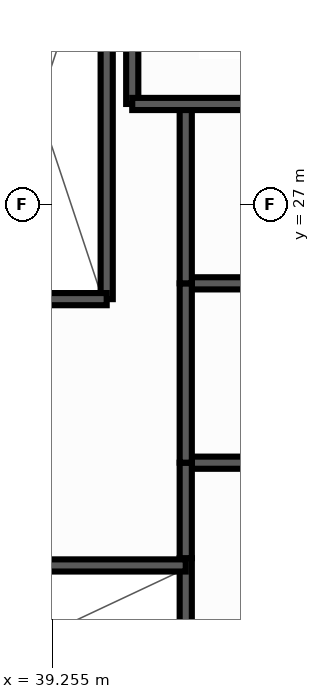
"""IFC4 building model, lengths in metres.
Left out: names, types, materials, properties, quantities, classifications, styles, units other than length and angle.
Written with IfcOpenShell. Run it as: python <this file> out.ifc"""

import sys

from ifc_helpers import new_model, si_unit, direction, frame, frame_2d, origin, place, context, subcontext, project, spatial, rectangle, extrude, source, transform, mapped, element, fill, save


model = new_model("IFC4")
c1 = context("Model", 3, precision=1e-05, world=origin(), true_north=direction((0.0, 1.0)))
c2 = subcontext(c1, "Body", "Model", "MODEL_VIEW")
j1 = project(units=[si_unit("LENGTHUNIT", "METRE"), si_unit("PLANEANGLEUNIT", "RADIAN")], contexts=[c1])
p1 = place(None, origin())
s1 = spatial("IfcSite", under=j1, at=p1, CompositionType="ELEMENT")
p2 = place(p1, origin())
s2 = spatial("IfcBuilding", under=s1, at=p2, CompositionType="ELEMENT")
p3 = place(p2, frame((0.0, 0.0, 148.7)))
s3 = spatial("IfcBuildingStorey", under=s2, at=p3, CompositionType="ELEMENT", Elevation=148.7)
p4 = place(p3, frame((41.55, 22.75, 0.0), z_axis=(0.0, 0.0, 1.0), x_axis=(1.0, 0.0, 0.0)))
e1 = element("IfcWall", 1, at=p4, inside=s3, PredefinedType="PARTITIONING", context=c2, shape_type="SweptSolid", body=[
    extrude(rectangle(XDim=2.67, YDim=0.2, at=frame_2d((1.335, 0.0))), origin(), (0.0, 0.0, 1.0), 3.16),
])
p5 = place(p3, frame((41.55, 25.7, 0.0), z_axis=(0.0, 0.0, 1.0), x_axis=(1.0, 0.0, 0.0)))
e2 = element("IfcWall", 2, at=p5, inside=s3, PredefinedType="PARTITIONING", context=c2, shape_type="SweptSolid", body=[
    extrude(rectangle(XDim=2.67, YDim=0.2, at=frame_2d((1.335, 0.0))), origin(), (0.0, 0.0, 1.0), 2.64),
])
p6 = place(p3, frame((41.45, 18.22, 0.0), z_axis=(0.0, 0.0, 1.0), x_axis=(0.0, 1.0, 0.0)))
e3 = element("IfcWall", 3, at=p6, inside=s3, PredefinedType="PARTITIONING", context=c2, shape_type="SweptSolid", body=[
    extrude(rectangle(XDim=2.96, YDim=0.2, at=frame_2d((1.48, 0.0))), origin(), (0.0, 0.0, 1.0), 3.16),
])
p7 = place(p3, frame((41.45, 21.18, 0.0), z_axis=(0.0, 0.0, 1.0), x_axis=(0.0, 1.0, 0.0)))
e4 = element("IfcWall", 4, at=p7, inside=s3, PredefinedType="PARTITIONING", context=c2, shape_type="SweptSolid", body=[
    extrude(rectangle(XDim=1.57, YDim=0.2, at=frame_2d((0.785, 0.0))), origin(), (0.0, 0.0, 1.0), 3.16),
])
p8 = place(p7, frame((0.38, 0.0, 0.0)))
e5 = element("IfcOpeningElement", 5, at=p8, cuts=e4, PredefinedType="OPENING", context=c2, shape_type="SweptSolid", body=[
    extrude(rectangle(XDim=0.8, YDim=2.05, at=frame_2d((0.4, 1.025))), frame((0.0, 0.112, 0.0), z_axis=(0.0, -1.0, 0.0), x_axis=(1.0, 0.0, 0.0)), (0.0, 0.0, 1.0), 0.224),
])
p9 = place(p3, frame((41.45, 22.75, 0.0), z_axis=(0.0, 0.0, 1.0), x_axis=(0.0, 1.0, 0.0)))
e6 = element("IfcWall", 6, at=p9, inside=s3, PredefinedType="PARTITIONING", context=c2, shape_type="SweptSolid", body=[
    extrude(rectangle(XDim=2.95, YDim=0.2, at=frame_2d((1.475, 0.0))), origin(), (0.0, 0.0, 1.0), 3.16),
])
p10 = place(p9, frame((1.05, 0.0, 0.0)))
e7 = element("IfcOpeningElement", 7, at=p10, cuts=e6, PredefinedType="OPENING", context=c2, shape_type="SweptSolid", body=[
    extrude(rectangle(XDim=0.8, YDim=2.05, at=frame_2d((0.4, 1.025))), frame((0.0, 0.112, 0.0), z_axis=(0.0, -1.0, 0.0), x_axis=(1.0, 0.0, 0.0)), (0.0, 0.0, 1.0), 0.224),
])
p11 = place(p3, frame((41.45, 25.7, 0.0), z_axis=(0.0, 0.0, 1.0), x_axis=(0.0, 1.0, 0.0)))
e8 = element("IfcWall", 8, at=p11, inside=s3, PredefinedType="PARTITIONING", context=c2, shape_type="SweptSolid", body=[
    extrude(rectangle(XDim=2.9, YDim=0.2, at=frame_2d((1.45, 0.0))), origin(), (0.0, 0.0, 1.0), 3.16),
])
p12 = place(p11, frame((1.0, 0.0, 0.0)))
e9 = element("IfcOpeningElement", 9, at=p12, cuts=e8, PredefinedType="OPENING", context=c2, shape_type="SweptSolid", body=[
    extrude(rectangle(XDim=0.9, YDim=2.1, at=frame_2d((0.45, 1.05))), frame((0.0, 0.112, 0.0), z_axis=(0.0, -1.0, 0.0), x_axis=(1.0, 0.0, 0.0)), (0.0, 0.0, 1.0), 0.224),
])
p13 = place(p3, frame((40.15, 25.44, 0.0), z_axis=(0.0, 0.0, 1.0), x_axis=(0.0, 1.0, 0.0)))
e10 = element("IfcWall", 10, at=p13, inside=s3, PredefinedType="PARTITIONING", context=c2, shape_type="SweptSolid", body=[
    extrude(rectangle(XDim=6.36, YDim=0.2, at=frame_2d((3.18, 0.0))), origin(), (0.0, 0.0, 1.0), 3.16),
])
p14 = place(p3, frame((35.43, 21.06, 0.0), z_axis=(0.0, 0.0, 1.0), x_axis=(1.0, 0.0, 0.0)))
e11 = element("IfcWall", 11, at=p14, inside=s3, PredefinedType="PARTITIONING", context=c2, shape_type="SweptSolid", body=[
    extrude(rectangle(XDim=6.02, YDim=0.2, at=frame_2d((3.01, 0.0))), origin(), (0.0, 0.0, 1.0), 3.16),
])
p15 = place(p14, frame((1.0, 0.0, 0.0)))
e12 = element("IfcOpeningElement", 12, at=p15, cuts=e11, PredefinedType="OPENING", context=c2, shape_type="SweptSolid", body=[
    extrude(rectangle(XDim=1.1, YDim=2.15, at=frame_2d((0.55, 1.075))), frame((0.0, 0.112, 0.0), z_axis=(0.0, -1.0, 0.0), x_axis=(1.0, 0.0, 0.0)), (0.0, 0.0, 1.0), 0.224),
])
p16 = place(p14, frame((2.95, 0.0, 0.0)))
e13 = element("IfcOpeningElement", 13, at=p16, cuts=e11, PredefinedType="OPENING", context=c2, shape_type="SweptSolid", body=[
    extrude(rectangle(XDim=1.1, YDim=2.15, at=frame_2d((0.55, 1.075))), frame((0.0, 0.112, 0.0), z_axis=(0.0, -1.0, 0.0), x_axis=(1.0, 0.0, 0.0)), (0.0, 0.0, 1.0), 0.224),
])
p17 = place(p14, frame((4.58, 0.0, 0.0)))
e14 = element("IfcOpeningElement", 14, at=p17, cuts=e11, PredefinedType="OPENING", context=c2, shape_type="SweptSolid", body=[
    extrude(rectangle(XDim=1.2, YDim=2.15, at=frame_2d((0.6, 1.075))), frame((0.0, 0.112, 0.0), z_axis=(0.0, -1.0, 0.0), x_axis=(1.0, 0.0, 0.0)), (0.0, 0.0, 1.0), 0.224),
])
p18 = place(p3, frame((35.43, 25.44, 0.0), z_axis=(0.0, 0.0, 1.0), x_axis=(1.0, 0.0, 0.0)))
e15 = element("IfcWall", 15, at=p18, inside=s3, PredefinedType="PARTITIONING", context=c2, shape_type="SweptSolid", body=[
    extrude(rectangle(XDim=4.72, YDim=0.2, at=frame_2d((2.36, 0.0))), origin(), (0.0, 0.0, 1.0), 3.16),
])
p19 = place(p18, frame((1.25, 0.0, 0.0)))
e16 = element("IfcOpeningElement", 16, at=p19, cuts=e15, PredefinedType="OPENING", context=c2, shape_type="SweptSolid", body=[
    extrude(rectangle(XDim=1.1, YDim=2.15, at=frame_2d((0.55, 1.075))), frame((0.0, 0.112, 0.0), z_axis=(0.0, -1.0, 0.0), x_axis=(1.0, 0.0, 0.0)), (0.0, 0.0, 1.0), 0.224),
])
p20 = place(p3, frame((40.57, 28.65, 0.0), z_axis=(0.0, 0.0, 1.0), x_axis=(0.0, 1.0, 0.0)))
e17 = element("IfcWall", 17, at=p20, inside=s3, PredefinedType="SOLIDWALL", context=c2, shape_type="SweptSolid", body=[
    extrude(rectangle(XDim=7.05, YDim=0.2, at=frame_2d((3.525, 0.0))), origin(), (0.0, 0.0, 1.0), 3.29),
])
p21 = place(p3, frame((40.57, 28.65, 0.0), z_axis=(0.0, 0.0, 1.0), x_axis=(1.0, 0.0, 0.0)))
e18 = element("IfcWall", 18, at=p21, inside=s3, PredefinedType="SOLIDWALL", context=c2, shape_type="SweptSolid", body=[
    extrude(rectangle(XDim=3.93, YDim=0.2, at=frame_2d((1.965, 0.0))), origin(), (0.0, 0.0, 1.0), 3.29),
])
m1 = source(origin(), c2, "Body", "SweptSolid", [
    extrude(rectangle(XDim=0.8, YDim=2.05, at=frame_2d((0.4, 1.025))), frame((0.0, 0.025, 0.0), z_axis=(0.0, -1.0, 0.0), x_axis=(1.0, 0.0, 0.0)), (0.0, 0.0, 1.0), 0.05),
])
p22 = place(p8, origin())
e19 = element("IfcDoor", 19, at=p22, inside=s3, OperationType="SINGLE_SWING_LEFT", PredefinedType="DOOR", context=c2, shape_type="MappedRepresentation", body=[
    mapped(m1, transform((0.0, 0.0, 0.0), scale=1.0)),
])
fill(e5, e19)
p23 = place(p10, origin())
e20 = element("IfcDoor", 20, at=p23, inside=s3, OperationType="SINGLE_SWING_RIGHT", PredefinedType="DOOR", context=c2, shape_type="MappedRepresentation", body=[
    mapped(m1, transform((0.0, 0.0, 0.0), scale=1.0)),
])
fill(e7, e20)
m2 = source(origin(), c2, "Body", "SweptSolid", [
    extrude(rectangle(XDim=0.9, YDim=2.1, at=frame_2d((0.45, 1.05))), frame((0.0, 0.025, 0.0), z_axis=(0.0, -1.0, 0.0), x_axis=(1.0, 0.0, 0.0)), (0.0, 0.0, 1.0), 0.05),
])
p24 = place(p12, origin())
e21 = element("IfcDoor", 21, at=p24, inside=s3, OperationType="SINGLE_SWING_LEFT", PredefinedType="DOOR", context=c2, shape_type="MappedRepresentation", body=[
    mapped(m2, transform((0.0, 0.0, 0.0), scale=1.0)),
])
fill(e9, e21)
m3 = source(origin(), c2, "Body", "SweptSolid", [
    extrude(rectangle(XDim=1.1, YDim=2.15, at=frame_2d((0.55, 1.075))), frame((0.0, 0.025, 0.0), z_axis=(0.0, -1.0, 0.0), x_axis=(1.0, 0.0, 0.0)), (0.0, 0.0, 1.0), 0.05),
])
p25 = place(p16, origin())
e22 = element("IfcDoor", 22, at=p25, inside=s3, OperationType="DOUBLE_DOOR_SLIDING", PredefinedType="DOOR", context=c2, shape_type="MappedRepresentation", body=[
    mapped(m3, transform((0.0, 0.0, 0.0), scale=1.0)),
])
fill(e13, e22)
m4 = source(origin(), c2, "Body", "SweptSolid", [
    extrude(rectangle(XDim=1.2, YDim=2.15, at=frame_2d((0.6, 1.075))), frame((0.0, 0.025, 0.0), z_axis=(0.0, -1.0, 0.0), x_axis=(1.0, 0.0, 0.0)), (0.0, 0.0, 1.0), 0.05),
])
p26 = place(p17, origin())
e23 = element("IfcDoor", 23, at=p26, inside=s3, OperationType="DOUBLE_DOOR_SLIDING", PredefinedType="DOOR", context=c2, shape_type="MappedRepresentation", body=[
    mapped(m4, transform((0.0, 0.0, 0.0), scale=1.0)),
])
fill(e14, e23)
save(model, sys.argv[1])
